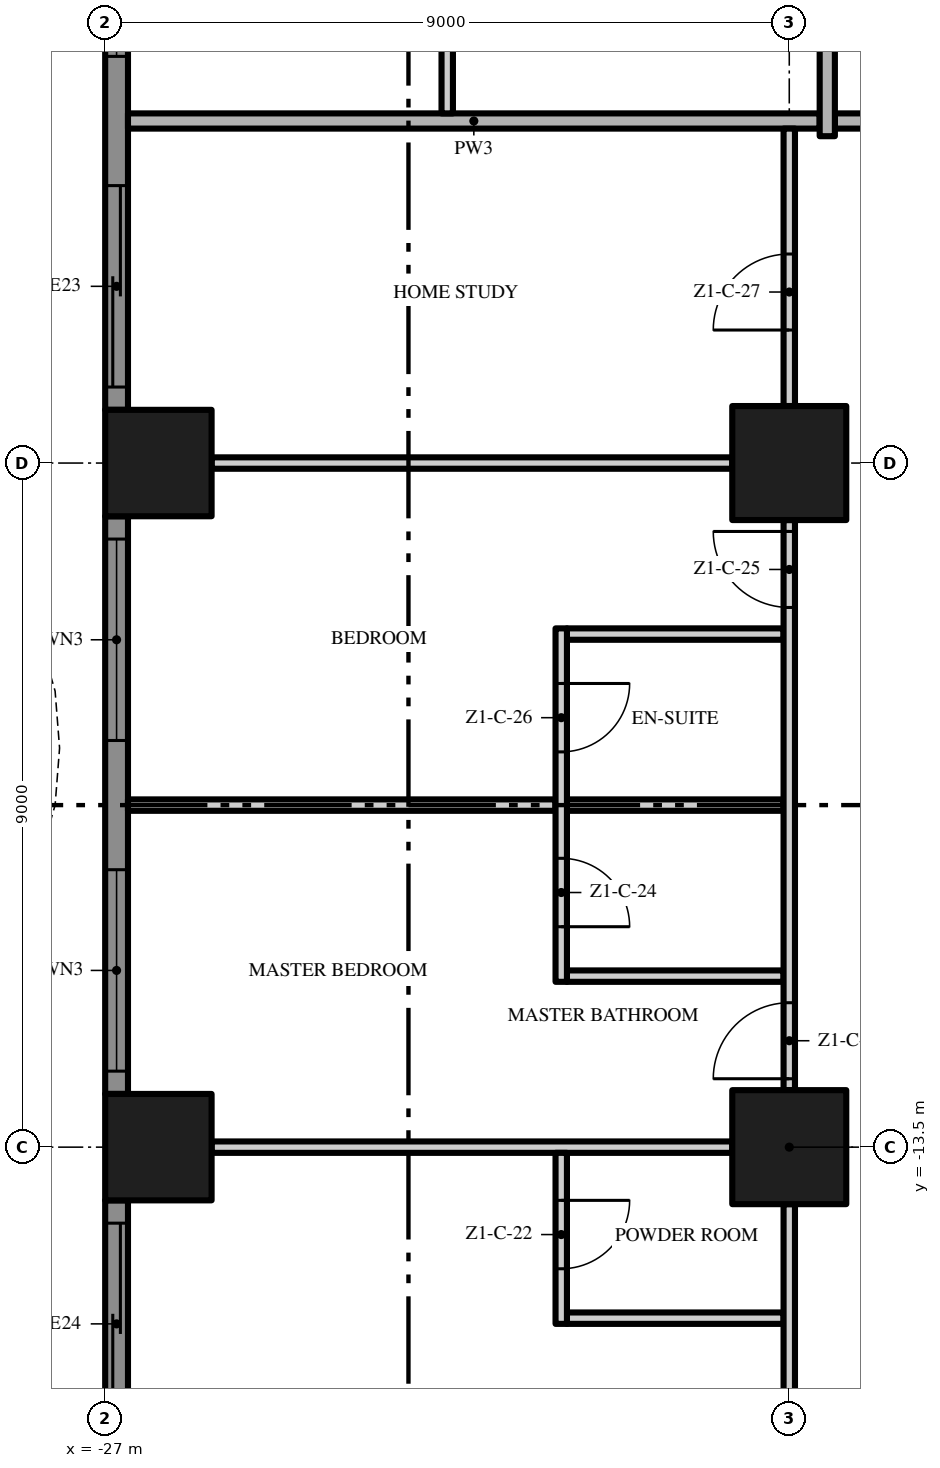
"""IFC4 building model, lengths in metres.
Left out: names, types, materials, properties, quantities, classifications, styles, units other than length and angle.
Written with IfcOpenShell. Run it as: python <this file> out.ifc"""

import sys

from ifc_helpers import new_model, si_unit, direction, frame, frame_2d, origin, origin_2d, place, context, subcontext, project, spatial, polyline, rectangle, outline, extrude, element, fill, save


model = new_model("IFC4")
c1 = context("Model", 3, precision=1e-05, world=origin(), true_north=direction((0.0, 1.0)))
c2 = subcontext(c1, "Body", "Model", "MODEL_VIEW")
j1 = project(units=[si_unit("LENGTHUNIT", "METRE"), si_unit("PLANEANGLEUNIT", "RADIAN")], contexts=[c1])
p1 = place(None, origin())
s1 = spatial("IfcSite", under=j1, at=p1, CompositionType="ELEMENT")
p2 = place(p1, origin())
s2 = spatial("IfcBuilding", under=s1, at=p2, CompositionType="ELEMENT")
p3 = place(p2, frame((0.0, 0.0, 45.4)))
s3 = spatial("IfcBuildingStorey", under=s2, at=p3, CompositionType="ELEMENT", Elevation=45.4)
for number, where, z_axis, x_axis in (
    (1, (-18.0, -13.5, 0.0), (0.0, 0.0, 1.0), (1.0, 0.0, 0.0)),
    (2, (-18.0, -4.5, 0.0), (0.0, 0.0, 1.0), (1.0, 0.0, 0.0)),
):
    element("IfcColumn", number, at=place(p3, frame(where, z_axis=z_axis, x_axis=x_axis)), inside=s3, PredefinedType="COLUMN", context=c2, shape_type="SweptSolid", body=[
        extrude(rectangle(XDim=1.5, YDim=1.5, at=origin_2d()), origin(), (0.0, 0.0, 1.0), 3.5),
    ])
for number, where, z_axis, x_axis in (
    (3, (-26.3, -13.5, 0.0), (0.0, 0.0, 1.0), (1.0, 0.0, 0.0)),
    (4, (-26.3, -4.5, 0.0), (0.0, 0.0, 1.0), (1.0, 0.0, 0.0)),
):
    element("IfcColumn", number, at=place(p3, frame(where, z_axis=z_axis, x_axis=x_axis)), inside=s3, PredefinedType="COLUMN", context=c2, shape_type="SweptSolid", body=[
        extrude(rectangle(XDim=1.4, YDim=1.4, at=origin_2d()), origin(), (0.0, 0.0, 1.0), 3.5),
    ])
p4 = place(p3, frame((-26.85, -3.8, 0.0), z_axis=(0.0, 0.0, 1.0), x_axis=(0.0, 1.0, 0.0)))
e5 = element("IfcWall", 5, at=p4, inside=s3, PredefinedType="SOLIDWALL", context=c2, shape_type="SweptSolid", body=[
    extrude(rectangle(XDim=7.6, YDim=0.3, at=frame_2d((3.8, 0.0))), origin(), (0.0, 0.0, 1.0), 3.5),
])
p5 = place(p4, frame((4.65, 0.0, 0.45)))
e6 = element("IfcOpeningElement", 6, at=p5, cuts=e5, PredefinedType="OPENING", context=c2, shape_type="SweptSolid", body=[
    extrude(rectangle(XDim=2.65, YDim=2.65, at=frame_2d((1.325, 1.325))), frame((0.0, 0.16, 0.0), z_axis=(0.0, -1.0, 0.0), x_axis=(1.0, 0.0, 0.0)), (0.0, 0.0, 1.0), 0.32),
])
p6 = place(p4, frame((0.3, 0.0, 0.0)))
e7 = element("IfcOpeningElement", 7, at=p6, cuts=e5, PredefinedType="OPENING", context=c2, shape_type="SweptSolid", body=[
    extrude(rectangle(XDim=2.65, YDim=2.4, at=frame_2d((1.325, 1.2))), frame((0.0, 0.16, 0.0), z_axis=(0.0, -1.0, 0.0), x_axis=(1.0, 0.0, 0.0)), (0.0, 0.0, 1.0), 0.32),
])
p7 = place(p3, frame((-26.85, -12.8, 0.0), z_axis=(0.0, 0.0, 1.0), x_axis=(0.0, 1.0, 0.0)))
e8 = element("IfcWall", 8, at=p7, inside=s3, PredefinedType="SOLIDWALL", context=c2, shape_type="SweptSolid", body=[
    extrude(rectangle(XDim=7.6, YDim=0.3, at=frame_2d((3.8, 0.0))), origin(), (0.0, 0.0, 1.0), 3.5),
])
p8 = place(p7, frame((4.65, 0.0, 0.45)))
e9 = element("IfcOpeningElement", 9, at=p8, cuts=e8, PredefinedType="OPENING", context=c2, shape_type="SweptSolid", body=[
    extrude(rectangle(XDim=2.65, YDim=2.65, at=frame_2d((1.325, 1.325))), frame((0.0, 0.16, 0.0), z_axis=(0.0, -1.0, 0.0), x_axis=(1.0, 0.0, 0.0)), (0.0, 0.0, 1.0), 0.32),
])
p9 = place(p7, frame((0.3, 0.0, 0.45)))
e10 = element("IfcOpeningElement", 10, at=p9, cuts=e8, PredefinedType="OPENING", context=c2, shape_type="SweptSolid", body=[
    extrude(rectangle(XDim=2.65, YDim=2.65, at=frame_2d((1.325, 1.325))), frame((0.0, 0.16, 0.0), z_axis=(0.0, -1.0, 0.0), x_axis=(1.0, 0.0, 0.0)), (0.0, 0.0, 1.0), 0.32),
])
p10 = place(p3, frame((-26.85, -18.0, 0.0), z_axis=(0.0, 0.0, 1.0), x_axis=(0.0, 1.0, 0.0)))
e11 = element("IfcWall", 11, at=p10, inside=s3, PredefinedType="SOLIDWALL", context=c2, shape_type="SweptSolid", body=[
    extrude(rectangle(XDim=3.8, YDim=0.3, at=frame_2d((1.9, 0.0))), origin(), (0.0, 0.0, 1.0), 3.5),
])
p11 = place(p10, frame((0.85, 0.0, 0.0)))
e12 = element("IfcOpeningElement", 12, at=p11, cuts=e11, PredefinedType="OPENING", context=c2, shape_type="SweptSolid", body=[
    extrude(rectangle(XDim=2.65, YDim=2.4, at=frame_2d((1.325, 1.2))), frame((0.0, 0.16, 0.0), z_axis=(0.0, -1.0, 0.0), x_axis=(1.0, 0.0, 0.0)), (0.0, 0.0, 1.0), 0.32),
])
p12 = place(p3, origin())
e13 = element("IfcWall", 13, at=p12, inside=s3, PredefinedType="USERDEFINED", context=c2, shape_type="SweptSolid", body=[
    extrude(outline(polyline([(-28.8, 18.0), (-29.505, 16.5), (-29.941, 15.0), (-30.0, 14.25), (-29.941, 13.5), (-29.505, 12.0), (-28.8, 10.5), (-28.095, 9.0), (-27.659, 7.5), (-27.6, 6.75), (-27.659, 6.0), (-28.095, 4.5), (-28.8, 3.0), (-29.505, 1.5), (-29.941, 0.0), (-30.0, -0.75), (-29.941, -1.5), (-29.505, -3.0), (-28.8, -4.5), (-28.095, -6.0), (-27.659, -7.5), (-27.6, -8.25), (-27.659, -9.0), (-28.095, -10.5), (-28.8, -12.0), (-29.505, -13.5), (-29.941, -15.0), (-30.0, -15.75), (-29.941, -16.5), (-29.505, -18.0), (-29.265, -17.93), (-29.694, -16.455), (-29.749, -15.75), (-29.694, -15.045), (-29.271, -13.589), (-28.574, -12.106), (-27.86, -10.589), (-27.411, -9.045), (-27.349, -8.25), (-27.411, -7.455), (-27.86, -5.911), (-28.574, -4.394), (-29.271, -2.911), (-29.694, -1.455), (-29.749, -0.75), (-29.694, -0.045), (-29.271, 1.411), (-28.574, 2.894), (-27.86, 4.411), (-27.411, 5.955), (-27.349, 6.75), (-27.411, 7.545), (-27.86, 9.089), (-28.574, 10.606), (-29.271, 12.089), (-29.694, 13.545), (-29.749, 14.25), (-29.694, 14.955), (-29.271, 16.411), (-28.574, 17.894), (-28.8, 18.0)])), origin(), (0.0, 0.0, 1.0), 0.9),
])
p13 = place(p3, frame((-20.925, -15.75, 0.0), z_axis=(0.0, 0.0, 1.0), x_axis=(1.0, 0.0, 0.0)))
e14 = element("IfcWall", 14, at=p13, inside=s3, PredefinedType="PARTITIONING", context=c2, shape_type="SweptSolid", body=[
    extrude(rectangle(XDim=2.85, YDim=0.15, at=frame_2d((1.425, 0.0))), origin(), (0.0, 0.0, 1.0), 3.5),
])
p14 = place(p3, frame((-25.6, -13.5, 0.0), z_axis=(0.0, 0.0, 1.0), x_axis=(1.0, 0.0, 0.0)))
e15 = element("IfcWall", 15, at=p14, inside=s3, PredefinedType="PARTITIONING", context=c2, shape_type="SweptSolid", body=[
    extrude(rectangle(XDim=6.85, YDim=0.15, at=frame_2d((3.425, 0.0))), origin(), (0.0, 0.0, 1.0), 3.5),
])
p15 = place(p3, frame((-20.925, -11.25, 0.0), z_axis=(0.0, 0.0, 1.0), x_axis=(1.0, 0.0, 0.0)))
e16 = element("IfcWall", 16, at=p15, inside=s3, PredefinedType="PARTITIONING", context=c2, shape_type="SweptSolid", body=[
    extrude(rectangle(XDim=2.85, YDim=0.15, at=frame_2d((1.425, 0.0))), origin(), (0.0, 0.0, 1.0), 3.5),
])
p16 = place(p3, frame((-26.7, -9.0, 0.0), z_axis=(0.0, 0.0, 1.0), x_axis=(1.0, 0.0, 0.0)))
e17 = element("IfcWall", 17, at=p16, inside=s3, PredefinedType="PARTITIONING", context=c2, shape_type="SweptSolid", body=[
    extrude(rectangle(XDim=5.625, YDim=0.15, at=frame_2d((2.812, 0.0))), origin(), (0.0, 0.0, 1.0), 3.5),
])
for number, where, z_axis, x_axis in (
    (18, (-20.925, -9.0, 0.0), (0.0, 0.0, 1.0), (1.0, 0.0, 0.0)),
    (19, (-20.925, -6.75, 0.0), (0.0, 0.0, 1.0), (1.0, 0.0, 0.0)),
):
    element("IfcWall", number, at=place(p3, frame(where, z_axis=z_axis, x_axis=x_axis)), inside=s3, PredefinedType="PARTITIONING", context=c2, shape_type="SweptSolid", body=[
        extrude(rectangle(XDim=2.85, YDim=0.15, at=frame_2d((1.425, 0.0))), origin(), (0.0, 0.0, 1.0), 3.5),
    ])
p17 = place(p3, frame((-25.6, -4.5, 0.0), z_axis=(0.0, 0.0, 1.0), x_axis=(1.0, 0.0, 0.0)))
e20 = element("IfcWall", 20, at=p17, inside=s3, PredefinedType="PARTITIONING", context=c2, shape_type="SweptSolid", body=[
    extrude(rectangle(XDim=6.85, YDim=0.15, at=frame_2d((3.425, 0.0))), origin(), (0.0, 0.0, 1.0), 3.5),
])
p18 = place(p3, frame((-17.4, 0.0, 0.0), z_axis=(0.0, 0.0, 1.0), x_axis=(1.0, 0.0, 0.0)))
e21 = element("IfcWall", 21, at=p18, inside=s3, PredefinedType="PARTITIONING", context=c2, shape_type="SweptSolid", body=[
    extrude(rectangle(XDim=12.8, YDim=0.2, at=frame_2d((6.4, 0.0))), origin(), (0.0, 0.0, 1.0), 3.5),
])
p19 = place(p3, frame((-26.7, 0.0, 0.0), z_axis=(0.0, 0.0, 1.0), x_axis=(1.0, 0.0, 0.0)))
e22 = element("IfcWall", 22, at=p19, inside=s3, PredefinedType="PARTITIONING", context=c2, shape_type="SweptSolid", body=[
    extrude(rectangle(XDim=9.1, YDim=0.2, at=frame_2d((4.55, 0.0))), origin(), (0.0, 0.0, 1.0), 3.5),
])
p20 = place(p3, frame((-22.5, 0.1, 0.0), z_axis=(0.0, 0.0, 1.0), x_axis=(0.0, 1.0, 0.0)))
e23 = element("IfcWall", 23, at=p20, inside=s3, PredefinedType="PARTITIONING", context=c2, shape_type="SweptSolid", body=[
    extrude(rectangle(XDim=17.2, YDim=0.15, at=frame_2d((8.6, 0.0))), origin(), (0.0, 0.0, 1.0), 3.5),
])
p21 = place(p20, frame((1.65, 0.0, 0.0)))
e24 = element("IfcOpeningElement", 24, at=p21, cuts=e23, PredefinedType="OPENING", context=c2, shape_type="SweptSolid", body=[
    extrude(rectangle(XDim=1.0, YDim=2.4, at=frame_2d((0.5, 1.2))), frame((0.0, 0.085, 0.0), z_axis=(0.0, -1.0, 0.0), x_axis=(1.0, 0.0, 0.0)), (0.0, 0.0, 1.0), 0.17),
])
p22 = place(p20, frame((8.0, 0.0, 0.0)))
e25 = element("IfcOpeningElement", 25, at=p22, cuts=e23, PredefinedType="OPENING", context=c2, shape_type="SweptSolid", body=[
    extrude(rectangle(XDim=1.8, YDim=2.4, at=frame_2d((0.9, 1.2))), frame((0.0, 0.085, 0.0), z_axis=(0.0, -1.0, 0.0), x_axis=(1.0, 0.0, 0.0)), (0.0, 0.0, 1.0), 0.17),
])
p23 = place(p20, frame((16.05, 0.0, 0.0)))
e26 = element("IfcOpeningElement", 26, at=p23, cuts=e23, PredefinedType="OPENING", context=c2, shape_type="SweptSolid", body=[
    extrude(rectangle(XDim=1.0, YDim=2.4, at=frame_2d((0.5, 1.2))), frame((0.0, 0.085, 0.0), z_axis=(0.0, -1.0, 0.0), x_axis=(1.0, 0.0, 0.0)), (0.0, 0.0, 1.0), 0.17),
])
p24 = place(p3, frame((-21.0, -13.575, 0.0), z_axis=(0.0, 0.0, 1.0), x_axis=(0.0, -1.0, 0.0)))
e27 = element("IfcWall", 27, at=p24, inside=s3, PredefinedType="PARTITIONING", context=c2, shape_type="SweptSolid", body=[
    extrude(rectangle(XDim=2.25, YDim=0.15, at=frame_2d((1.125, 0.0))), origin(), (0.0, 0.0, 1.0), 3.5),
])
p25 = place(p24, frame((0.625, 0.0, 0.0)))
e28 = element("IfcOpeningElement", 28, at=p25, cuts=e27, PredefinedType="OPENING", context=c2, shape_type="SweptSolid", body=[
    extrude(rectangle(XDim=0.9, YDim=2.1, at=frame_2d((0.45, 1.05))), frame((0.0, 0.085, 0.0), z_axis=(0.0, -1.0, 0.0), x_axis=(1.0, 0.0, 0.0)), (0.0, 0.0, 1.0), 0.17),
])
p26 = place(p3, frame((-21.0, -6.675, 0.0), z_axis=(0.0, 0.0, 1.0), x_axis=(0.0, -1.0, 0.0)))
e29 = element("IfcWall", 29, at=p26, inside=s3, PredefinedType="PARTITIONING", context=c2, shape_type="SweptSolid", body=[
    extrude(rectangle(XDim=4.65, YDim=0.15, at=frame_2d((2.325, 0.0))), origin(), (0.0, 0.0, 1.0), 3.5),
])
p27 = place(p26, frame((3.025, 0.0, 0.0)))
e30 = element("IfcOpeningElement", 30, at=p27, cuts=e29, PredefinedType="OPENING", context=c2, shape_type="SweptSolid", body=[
    extrude(rectangle(XDim=0.9, YDim=2.1, at=frame_2d((0.45, 1.05))), frame((0.0, 0.085, 0.0), z_axis=(0.0, -1.0, 0.0), x_axis=(1.0, 0.0, 0.0)), (0.0, 0.0, 1.0), 0.17),
])
p28 = place(p26, frame((0.725, 0.0, 0.0)))
e31 = element("IfcOpeningElement", 31, at=p28, cuts=e29, PredefinedType="OPENING", context=c2, shape_type="SweptSolid", body=[
    extrude(rectangle(XDim=0.9, YDim=2.1, at=frame_2d((0.45, 1.05))), frame((0.0, 0.085, 0.0), z_axis=(0.0, -1.0, 0.0), x_axis=(1.0, 0.0, 0.0)), (0.0, 0.0, 1.0), 0.17),
])
p29 = place(p3, frame((-18.0, -21.1, 0.0), z_axis=(0.0, 0.0, 1.0), x_axis=(0.0, 1.0, 0.0)))
e32 = element("IfcWall", 32, at=p29, inside=s3, PredefinedType="PARTITIONING", context=c2, shape_type="SweptSolid", body=[
    extrude(rectangle(XDim=6.85, YDim=0.15, at=frame_2d((3.425, 0.0))), origin(), (0.0, 0.0, 1.0), 3.5),
])
p30 = place(p29, frame((1.1, 0.0, 0.0)))
e33 = element("IfcOpeningElement", 33, at=p30, cuts=e32, PredefinedType="OPENING", context=c2, shape_type="SweptSolid", body=[
    extrude(rectangle(XDim=1.8, YDim=2.4, at=frame_2d((0.9, 1.2))), frame((0.0, 0.085, 0.0), z_axis=(0.0, -1.0, 0.0), x_axis=(1.0, 0.0, 0.0)), (0.0, 0.0, 1.0), 0.17),
])
p31 = place(p3, frame((-18.0, -12.75, 0.0), z_axis=(0.0, 0.0, 1.0), x_axis=(0.0, 1.0, 0.0)))
e34 = element("IfcWall", 34, at=p31, inside=s3, PredefinedType="PARTITIONING", context=c2, shape_type="SweptSolid", body=[
    extrude(rectangle(XDim=7.5, YDim=0.15, at=frame_2d((3.75, 0.0))), origin(), (0.0, 0.0, 1.0), 3.5),
])
p32 = place(p31, frame((0.15, 0.0, 0.0)))
e35 = element("IfcOpeningElement", 35, at=p32, cuts=e34, PredefinedType="OPENING", context=c2, shape_type="SweptSolid", body=[
    extrude(rectangle(XDim=1.0, YDim=2.4, at=frame_2d((0.5, 1.2))), frame((0.0, 0.085, 0.0), z_axis=(0.0, -1.0, 0.0), x_axis=(1.0, 0.0, 0.0)), (0.0, 0.0, 1.0), 0.17),
])
p33 = place(p31, frame((6.35, 0.0, 0.0)))
e36 = element("IfcOpeningElement", 36, at=p33, cuts=e34, PredefinedType="OPENING", context=c2, shape_type="SweptSolid", body=[
    extrude(rectangle(XDim=1.0, YDim=2.4, at=frame_2d((0.5, 1.2))), frame((0.0, 0.085, 0.0), z_axis=(0.0, -1.0, 0.0), x_axis=(1.0, 0.0, 0.0)), (0.0, 0.0, 1.0), 0.17),
])
p34 = place(p3, frame((-18.0, -3.75, 0.0), z_axis=(0.0, 0.0, 1.0), x_axis=(0.0, 1.0, 0.0)))
e37 = element("IfcWall", 37, at=p34, inside=s3, PredefinedType="PARTITIONING", context=c2, shape_type="SweptSolid", body=[
    extrude(rectangle(XDim=3.65, YDim=0.15, at=frame_2d((1.825, 0.0))), origin(), (0.0, 0.0, 1.0), 3.5),
])
p35 = place(p34, frame((1.0, 0.0, 0.0)))
e38 = element("IfcOpeningElement", 38, at=p35, cuts=e37, PredefinedType="OPENING", context=c2, shape_type="SweptSolid", body=[
    extrude(rectangle(XDim=1.0, YDim=2.4, at=frame_2d((0.5, 1.2))), frame((0.0, 0.085, 0.0), z_axis=(0.0, -1.0, 0.0), x_axis=(1.0, 0.0, 0.0)), (0.0, 0.0, 1.0), 0.17),
])
p36 = place(p3, frame((-17.5, -0.2, 0.0), z_axis=(0.0, 0.0, 1.0), x_axis=(0.0, 1.0, 0.0)))
e39 = element("IfcWall", 39, at=p36, inside=s3, PredefinedType="PARTITIONING", context=c2, shape_type="SweptSolid", body=[
    extrude(rectangle(XDim=3.95, YDim=0.2, at=frame_2d((1.975, 0.0))), origin(), (0.0, 0.0, 1.0), 3.5),
])
p37 = place(p5, origin())
e40 = element("IfcWindow", 40, at=p37, inside=s3, PartitioningType="SINGLE_PANEL", PredefinedType="WINDOW", context=c2, shape_type="SweptSolid", body=[
    extrude(rectangle(XDim=2.65, YDim=2.65, at=frame_2d((1.325, 1.325))), frame((0.0, 0.03, 0.0), z_axis=(0.0, -1.0, 0.0), x_axis=(1.0, 0.0, 0.0)), (0.0, 0.0, 1.0), 0.06),
])
fill(e6, e40)
p38 = place(p6, origin())
e41 = element("IfcDoor", 41, at=p38, inside=s3, OperationType="SINGLE_SWING_LEFT", PredefinedType="DOOR", context=c2, shape_type="SweptSolid", body=[
    extrude(rectangle(XDim=2.65, YDim=2.4, at=frame_2d((1.325, 1.2))), frame((0.0, 0.025, 0.0), z_axis=(0.0, -1.0, 0.0), x_axis=(1.0, 0.0, 0.0)), (0.0, 0.0, 1.0), 0.05),
])
fill(e7, e41)
p39 = place(p8, origin())
e42 = element("IfcWindow", 42, at=p39, inside=s3, PartitioningType="SINGLE_PANEL", PredefinedType="WINDOW", context=c2, shape_type="SweptSolid", body=[
    extrude(rectangle(XDim=2.65, YDim=2.65, at=frame_2d((1.325, 1.325))), frame((0.0, 0.03, 0.0), z_axis=(0.0, -1.0, 0.0), x_axis=(1.0, 0.0, 0.0)), (0.0, 0.0, 1.0), 0.06),
])
fill(e9, e42)
p40 = place(p9, origin())
e43 = element("IfcWindow", 43, at=p40, inside=s3, PartitioningType="SINGLE_PANEL", PredefinedType="WINDOW", context=c2, shape_type="SweptSolid", body=[
    extrude(rectangle(XDim=2.65, YDim=2.65, at=frame_2d((1.325, 1.325))), frame((0.0, 0.03, 0.0), z_axis=(0.0, -1.0, 0.0), x_axis=(1.0, 0.0, 0.0)), (0.0, 0.0, 1.0), 0.06),
])
fill(e10, e43)
p41 = place(p11, origin())
e44 = element("IfcDoor", 44, at=p41, inside=s3, OperationType="SINGLE_SWING_LEFT", PredefinedType="DOOR", context=c2, shape_type="SweptSolid", body=[
    extrude(rectangle(XDim=2.65, YDim=2.4, at=frame_2d((1.325, 1.2))), frame((0.0, 0.025, 0.0), z_axis=(0.0, -1.0, 0.0), x_axis=(1.0, 0.0, 0.0)), (0.0, 0.0, 1.0), 0.05),
])
fill(e12, e44)
p42 = place(p25, origin())
e45 = element("IfcDoor", 45, at=p42, inside=s3, OperationType="SINGLE_SWING_LEFT", PredefinedType="DOOR", context=c2, shape_type="SweptSolid", body=[
    extrude(rectangle(XDim=0.9, YDim=2.1, at=frame_2d((0.45, 1.05))), frame((0.0, 0.025, 0.0), z_axis=(0.0, -1.0, 0.0), x_axis=(1.0, 0.0, 0.0)), (0.0, 0.0, 1.0), 0.05),
])
fill(e28, e45)
p43 = place(p32, origin())
e46 = element("IfcDoor", 46, at=p43, inside=s3, OperationType="SINGLE_SWING_LEFT", PredefinedType="DOOR", context=c2, shape_type="SweptSolid", body=[
    extrude(rectangle(XDim=1.0, YDim=2.4, at=frame_2d((0.5, 1.2))), frame((0.0, 0.025, 0.0), z_axis=(0.0, -1.0, 0.0), x_axis=(1.0, 0.0, 0.0)), (0.0, 0.0, 1.0), 0.05),
])
fill(e35, e46)
p44 = place(p27, origin())
e47 = element("IfcDoor", 47, at=p44, inside=s3, OperationType="SINGLE_SWING_RIGHT", PredefinedType="DOOR", context=c2, shape_type="SweptSolid", body=[
    extrude(rectangle(XDim=0.9, YDim=2.1, at=frame_2d((0.45, 1.05))), frame((0.0, 0.025, 0.0), z_axis=(0.0, -1.0, 0.0), x_axis=(1.0, 0.0, 0.0)), (0.0, 0.0, 1.0), 0.05),
])
fill(e30, e47)
p45 = place(p33, origin())
e48 = element("IfcDoor", 48, at=p45, inside=s3, OperationType="SINGLE_SWING_RIGHT", PredefinedType="DOOR", context=c2, shape_type="SweptSolid", body=[
    extrude(rectangle(XDim=1.0, YDim=2.4, at=frame_2d((0.5, 1.2))), frame((0.0, 0.025, 0.0), z_axis=(0.0, -1.0, 0.0), x_axis=(1.0, 0.0, 0.0)), (0.0, 0.0, 1.0), 0.05),
])
fill(e36, e48)
p46 = place(p28, origin())
e49 = element("IfcDoor", 49, at=p46, inside=s3, OperationType="SINGLE_SWING_LEFT", PredefinedType="DOOR", context=c2, shape_type="SweptSolid", body=[
    extrude(rectangle(XDim=0.9, YDim=2.1, at=frame_2d((0.45, 1.05))), frame((0.0, 0.025, 0.0), z_axis=(0.0, -1.0, 0.0), x_axis=(1.0, 0.0, 0.0)), (0.0, 0.0, 1.0), 0.05),
])
fill(e31, e49)
p47 = place(p35, origin())
e50 = element("IfcDoor", 50, at=p47, inside=s3, OperationType="SINGLE_SWING_LEFT", PredefinedType="DOOR", context=c2, shape_type="SweptSolid", body=[
    extrude(rectangle(XDim=1.0, YDim=2.4, at=frame_2d((0.5, 1.2))), frame((0.0, 0.025, 0.0), z_axis=(0.0, -1.0, 0.0), x_axis=(1.0, 0.0, 0.0)), (0.0, 0.0, 1.0), 0.05),
])
fill(e38, e50)
save(model, sys.argv[1])
